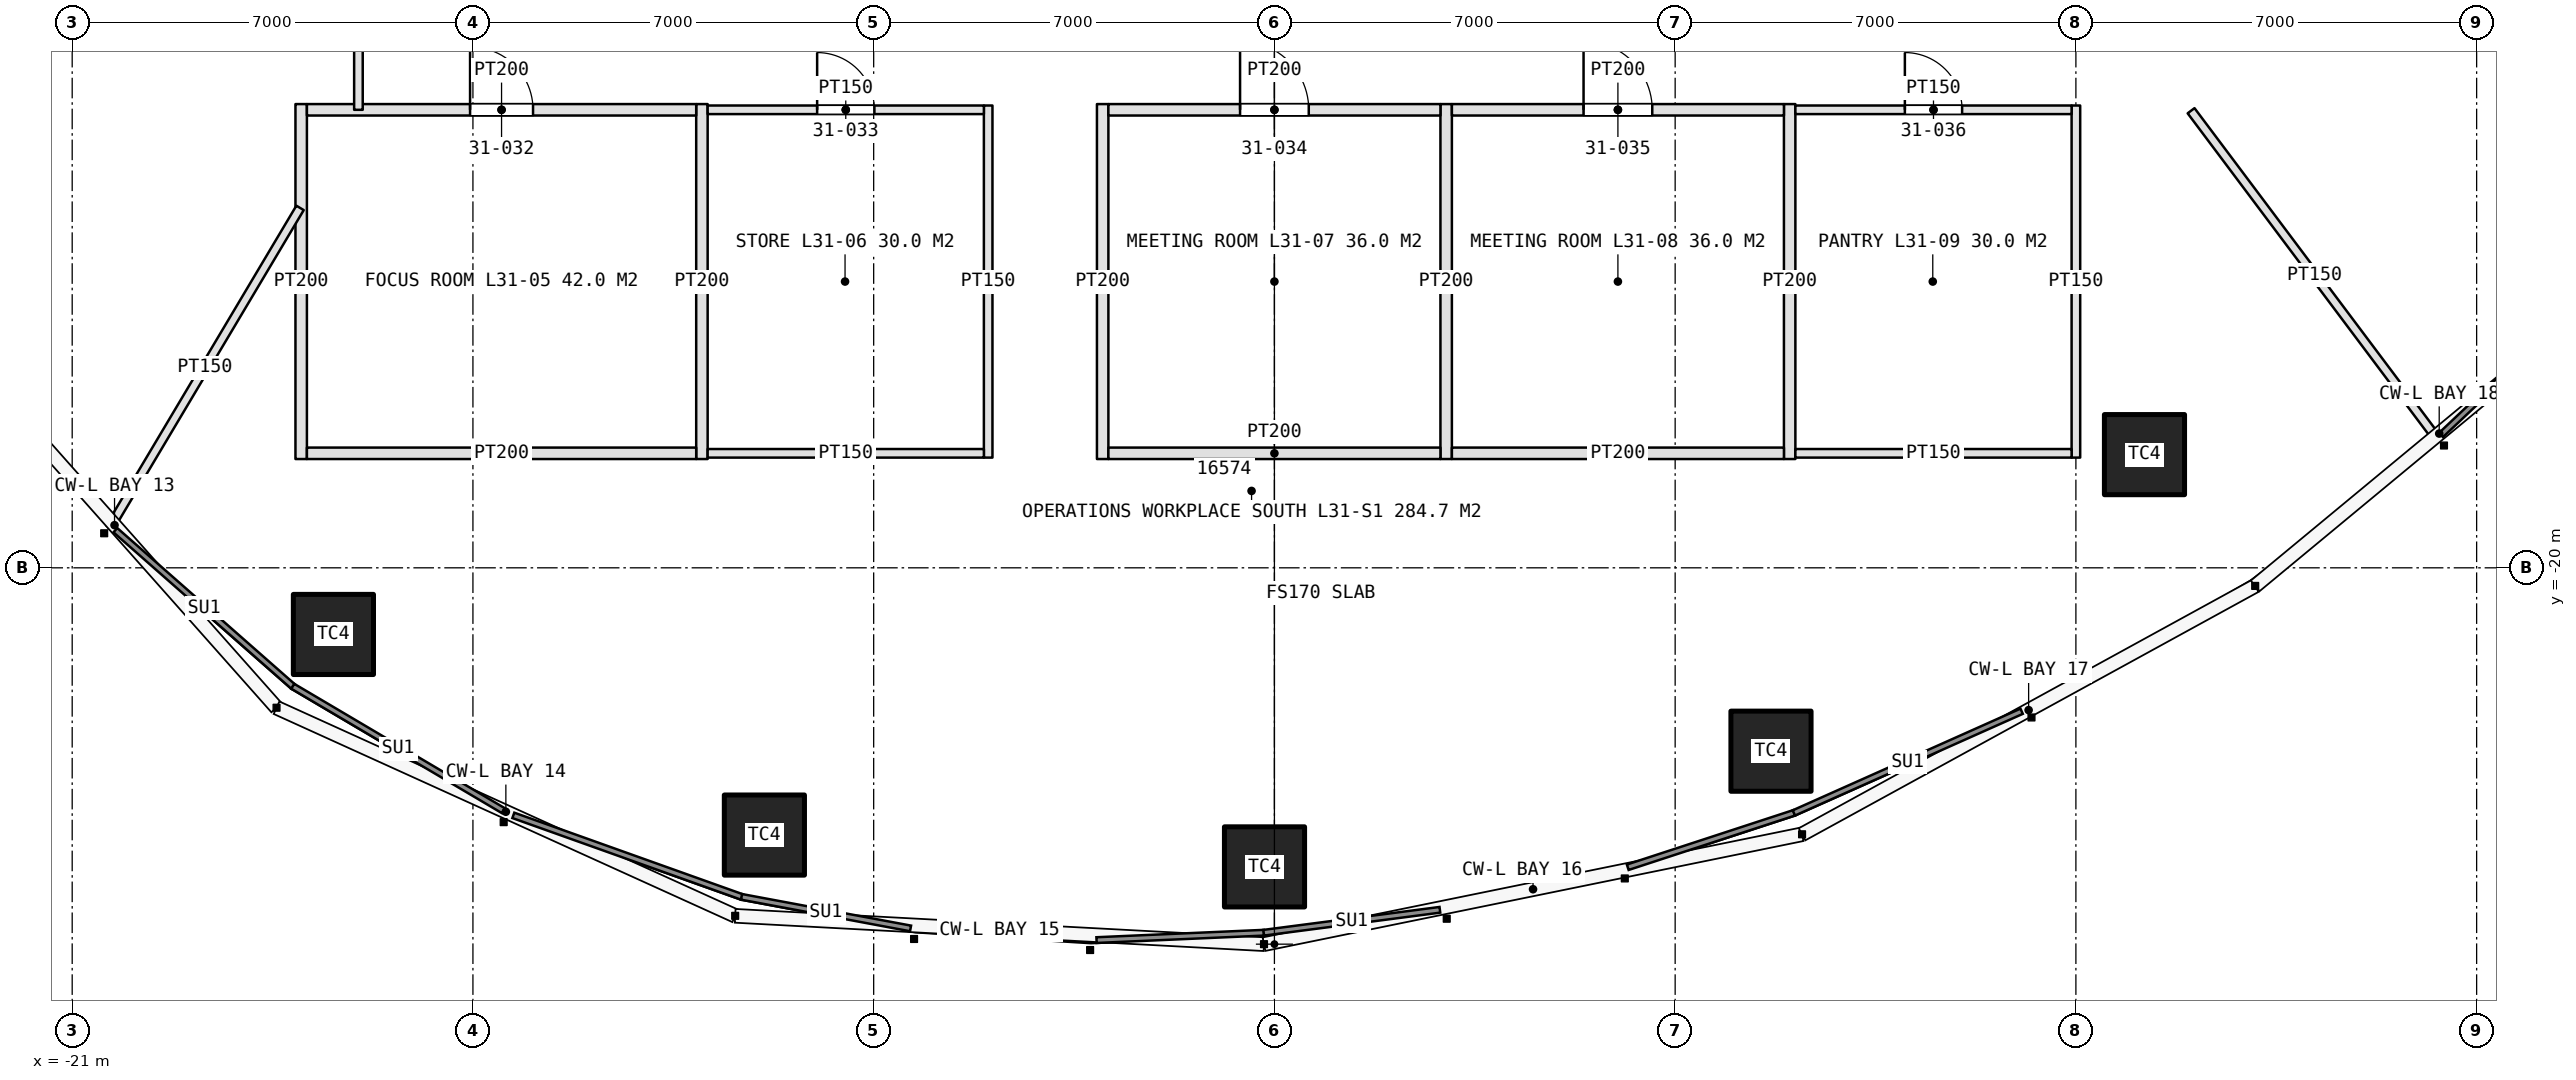
"""IFC4 building model, lengths in metres.
Left out: names, types, materials, properties, quantities, classifications, styles, units other than length and angle.
Written with IfcOpenShell. Run it as: python <this file> out.ifc"""

import sys

from ifc_helpers import new_model, si_unit, direction, frame, frame_2d, origin, origin_2d, place, context, subcontext, project, spatial, rectangle, extrude, element, fill, save


model = new_model("IFC4")
c1 = context("Model", 3, precision=1e-05, world=origin(), true_north=direction((0.0, 1.0)))
c2 = subcontext(c1, "Body", "Model", "MODEL_VIEW")
j1 = project(units=[si_unit("LENGTHUNIT", "METRE"), si_unit("PLANEANGLEUNIT", "RADIAN")], contexts=[c1])
p1 = place(None, origin())
s1 = spatial("IfcSite", under=j1, at=p1, CompositionType="ELEMENT")
p2 = place(p1, origin())
s2 = spatial("IfcBuilding", under=s1, at=p2, CompositionType="ELEMENT")
p3 = place(p2, frame((0.0, 0.0, 147.0)))
s3 = spatial("IfcBuildingStorey", under=s2, at=p3, CompositionType="ELEMENT", Elevation=147.0)
for number, where, z_axis, x_axis in (
    (1, (-16.437, -21.164, 0.0), (0.0, 0.0, 1.0), (1.0, 0.0, 0.0)),
    (2, (-8.909, -24.668, 0.0), (0.0, 0.0, 1.0), (1.0, 0.0, 0.0)),
    (3, (-0.173, -25.224, 0.0), (0.0, 0.0, 1.0), (1.0, 0.0, 0.0)),
    (4, (8.674, -23.203, 0.0), (0.0, 0.0, 1.0), (1.0, 0.0, 0.0)),
    (5, (15.198, -18.023, 0.0), (0.0, 0.0, 1.0), (1.0, 0.0, 0.0)),
):
    element("IfcColumn", number, at=place(p3, frame(where, z_axis=z_axis, x_axis=x_axis)), inside=s3, PredefinedType="COLUMN", context=c2, shape_type="SweptSolid", body=[
        extrude(rectangle(XDim=1.4, YDim=1.4, at=origin_2d()), origin(), (0.0, 0.0, 1.0), 4.2),
    ])
for number, where, z_axis, x_axis in (
    (6, (-17.0, -11.9, 0.0), (0.0, 0.0, 1.0), (0.0, -1.0, 0.0)),
    (7, (-10.0, -11.9, 0.0), (0.0, 0.0, 1.0), (0.0, -1.0, 0.0)),
):
    element("IfcWall", number, at=place(p3, frame(where, z_axis=z_axis, x_axis=x_axis)), inside=s3, PredefinedType="PARTITIONING", context=c2, shape_type="SweptSolid", body=[
        extrude(rectangle(XDim=6.2, YDim=0.2, at=frame_2d((3.1, 0.0))), origin(), (0.0, 0.0, 1.0), 3.0),
    ])
p4 = place(p3, frame((-5.0, -11.925, 0.0), z_axis=(0.0, 0.0, 1.0), x_axis=(0.0, -1.0, 0.0)))
e8 = element("IfcWall", 8, at=p4, inside=s3, PredefinedType="PARTITIONING", context=c2, shape_type="SweptSolid", body=[
    extrude(rectangle(XDim=6.15, YDim=0.15, at=frame_2d((3.075, 0.0))), origin(), (0.0, 0.0, 1.0), 3.0),
])
p5 = place(p3, frame((-16.9, -12.0, 0.0), z_axis=(0.0, 0.0, 1.0), x_axis=(1.0, 0.0, 0.0)))
e9 = element("IfcWall", 9, at=p5, inside=s3, PredefinedType="PARTITIONING", context=c2, shape_type="SweptSolid", body=[
    extrude(rectangle(XDim=6.8, YDim=0.2, at=frame_2d((3.4, 0.0))), origin(), (0.0, 0.0, 1.0), 3.0),
])
p6 = place(p5, frame((2.85, 0.0, 0.0)))
e10 = element("IfcOpeningElement", 10, at=p6, cuts=e9, PredefinedType="OPENING", context=c2, shape_type="SweptSolid", body=[
    extrude(rectangle(XDim=1.1, YDim=2.3, at=frame_2d((0.55, 1.15))), frame((0.0, 0.11, 0.0), z_axis=(0.0, -1.0, 0.0), x_axis=(1.0, 0.0, 0.0)), (0.0, 0.0, 1.0), 0.22),
])
p7 = place(p3, frame((-16.9, -18.0, 0.0), z_axis=(0.0, 0.0, 1.0), x_axis=(1.0, 0.0, 0.0)))
e11 = element("IfcWall", 11, at=p7, inside=s3, PredefinedType="PARTITIONING", context=c2, shape_type="SweptSolid", body=[
    extrude(rectangle(XDim=6.8, YDim=0.2, at=frame_2d((3.4, 0.0))), origin(), (0.0, 0.0, 1.0), 3.0),
])
p8 = place(p3, frame((-9.9, -12.0, 0.0), z_axis=(0.0, 0.0, 1.0), x_axis=(1.0, 0.0, 0.0)))
e12 = element("IfcWall", 12, at=p8, inside=s3, PredefinedType="PARTITIONING", context=c2, shape_type="SweptSolid", body=[
    extrude(rectangle(XDim=4.825, YDim=0.15, at=frame_2d((2.413, 0.0))), origin(), (0.0, 0.0, 1.0), 3.0),
])
p9 = place(p8, frame((1.913, 0.0, 0.0)))
e13 = element("IfcOpeningElement", 13, at=p9, cuts=e12, PredefinedType="OPENING", context=c2, shape_type="SweptSolid", body=[
    extrude(rectangle(XDim=1.0, YDim=2.2, at=frame_2d((0.5, 1.1))), frame((0.0, 0.085, 0.0), z_axis=(0.0, -1.0, 0.0), x_axis=(1.0, 0.0, 0.0)), (0.0, 0.0, 1.0), 0.17),
])
p10 = place(p3, frame((-9.9, -18.0, 0.0), z_axis=(0.0, 0.0, 1.0), x_axis=(1.0, 0.0, 0.0)))
e14 = element("IfcWall", 14, at=p10, inside=s3, PredefinedType="PARTITIONING", context=c2, shape_type="SweptSolid", body=[
    extrude(rectangle(XDim=4.825, YDim=0.15, at=frame_2d((2.413, 0.0))), origin(), (0.0, 0.0, 1.0), 3.0),
])
for number, where, z_axis, x_axis in (
    (15, (-3.0, -11.9, 0.0), (0.0, 0.0, 1.0), (0.0, -1.0, 0.0)),
    (16, (3.0, -11.9, 0.0), (0.0, 0.0, 1.0), (0.0, -1.0, 0.0)),
    (17, (9.0, -11.9, 0.0), (0.0, 0.0, 1.0), (0.0, -1.0, 0.0)),
):
    element("IfcWall", number, at=place(p3, frame(where, z_axis=z_axis, x_axis=x_axis)), inside=s3, PredefinedType="PARTITIONING", context=c2, shape_type="SweptSolid", body=[
        extrude(rectangle(XDim=6.2, YDim=0.2, at=frame_2d((3.1, 0.0))), origin(), (0.0, 0.0, 1.0), 3.0),
    ])
p11 = place(p3, frame((14.0, -11.925, 0.0), z_axis=(0.0, 0.0, 1.0), x_axis=(0.0, -1.0, 0.0)))
e18 = element("IfcWall", 18, at=p11, inside=s3, PredefinedType="PARTITIONING", context=c2, shape_type="SweptSolid", body=[
    extrude(rectangle(XDim=6.15, YDim=0.15, at=frame_2d((3.075, 0.0))), origin(), (0.0, 0.0, 1.0), 3.0),
])
p12 = place(p3, frame((-2.9, -12.0, 0.0), z_axis=(0.0, 0.0, 1.0), x_axis=(1.0, 0.0, 0.0)))
e19 = element("IfcWall", 19, at=p12, inside=s3, PredefinedType="PARTITIONING", context=c2, shape_type="SweptSolid", body=[
    extrude(rectangle(XDim=5.8, YDim=0.2, at=frame_2d((2.9, 0.0))), origin(), (0.0, 0.0, 1.0), 3.0),
])
p13 = place(p12, frame((2.3, 0.0, 0.0)))
e20 = element("IfcOpeningElement", 20, at=p13, cuts=e19, PredefinedType="OPENING", context=c2, shape_type="SweptSolid", body=[
    extrude(rectangle(XDim=1.2, YDim=2.4, at=frame_2d((0.6, 1.2))), frame((0.0, 0.11, 0.0), z_axis=(0.0, -1.0, 0.0), x_axis=(1.0, 0.0, 0.0)), (0.0, 0.0, 1.0), 0.22),
])
p14 = place(p3, frame((-2.9, -18.0, 0.0), z_axis=(0.0, 0.0, 1.0), x_axis=(1.0, 0.0, 0.0)))
e21 = element("IfcWall", 21, at=p14, inside=s3, PredefinedType="PARTITIONING", context=c2, shape_type="SweptSolid", body=[
    extrude(rectangle(XDim=5.8, YDim=0.2, at=frame_2d((2.9, 0.0))), origin(), (0.0, 0.0, 1.0), 3.0),
])
p15 = place(p3, frame((3.1, -12.0, 0.0), z_axis=(0.0, 0.0, 1.0), x_axis=(1.0, 0.0, 0.0)))
e22 = element("IfcWall", 22, at=p15, inside=s3, PredefinedType="PARTITIONING", context=c2, shape_type="SweptSolid", body=[
    extrude(rectangle(XDim=5.8, YDim=0.2, at=frame_2d((2.9, 0.0))), origin(), (0.0, 0.0, 1.0), 3.0),
])
p16 = place(p15, frame((2.3, 0.0, 0.0)))
e23 = element("IfcOpeningElement", 23, at=p16, cuts=e22, PredefinedType="OPENING", context=c2, shape_type="SweptSolid", body=[
    extrude(rectangle(XDim=1.2, YDim=2.4, at=frame_2d((0.6, 1.2))), frame((0.0, 0.11, 0.0), z_axis=(0.0, -1.0, 0.0), x_axis=(1.0, 0.0, 0.0)), (0.0, 0.0, 1.0), 0.22),
])
p17 = place(p3, frame((3.1, -18.0, 0.0), z_axis=(0.0, 0.0, 1.0), x_axis=(1.0, 0.0, 0.0)))
e24 = element("IfcWall", 24, at=p17, inside=s3, PredefinedType="PARTITIONING", context=c2, shape_type="SweptSolid", body=[
    extrude(rectangle(XDim=5.8, YDim=0.2, at=frame_2d((2.9, 0.0))), origin(), (0.0, 0.0, 1.0), 3.0),
])
p18 = place(p3, frame((9.1, -12.0, 0.0), z_axis=(0.0, 0.0, 1.0), x_axis=(1.0, 0.0, 0.0)))
e25 = element("IfcWall", 25, at=p18, inside=s3, PredefinedType="PARTITIONING", context=c2, shape_type="SweptSolid", body=[
    extrude(rectangle(XDim=4.825, YDim=0.15, at=frame_2d((2.413, 0.0))), origin(), (0.0, 0.0, 1.0), 3.0),
])
p19 = place(p18, frame((1.913, 0.0, 0.0)))
e26 = element("IfcOpeningElement", 26, at=p19, cuts=e25, PredefinedType="OPENING", context=c2, shape_type="SweptSolid", body=[
    extrude(rectangle(XDim=1.0, YDim=2.2, at=frame_2d((0.5, 1.1))), frame((0.0, 0.085, 0.0), z_axis=(0.0, -1.0, 0.0), x_axis=(1.0, 0.0, 0.0)), (0.0, 0.0, 1.0), 0.17),
])
p20 = place(p3, frame((9.1, -18.0, 0.0), z_axis=(0.0, 0.0, 1.0), x_axis=(1.0, 0.0, 0.0)))
e27 = element("IfcWall", 27, at=p20, inside=s3, PredefinedType="PARTITIONING", context=c2, shape_type="SweptSolid", body=[
    extrude(rectangle(XDim=4.825, YDim=0.15, at=frame_2d((2.413, 0.0))), origin(), (0.0, 0.0, 1.0), 3.0),
])
p21 = place(p3, frame((-17.02, -13.713, 0.0), z_axis=(0.0, 0.0, 1.0), x_axis=(-0.511508304982, -0.859278333216, 0.0)))
e28 = element("IfcWall", 28, at=p21, inside=s3, PredefinedType="PARTITIONING", context=c2, shape_type="SweptSolid", body=[
    extrude(rectangle(XDim=6.497, YDim=0.15, at=frame_2d((3.248, 0.0))), origin(), (0.0, 0.0, 1.0), 3.0),
])
p22 = place(p3, frame((16.012, -12.016, 0.0), z_axis=(0.0, 0.0, 1.0), x_axis=(0.600059749679, -0.799955184254, 0.0)))
e29 = element("IfcWall", 29, at=p22, inside=s3, PredefinedType="PARTITIONING", context=c2, shape_type="SweptSolid", body=[
    extrude(rectangle(XDim=7.191, YDim=0.15, at=frame_2d((3.596, 0.0))), origin(), (0.0, 0.0, 1.0), 3.0),
])
p23 = place(p3, frame((-16.0, -9.0, 0.0), z_axis=(0.0, 0.0, 1.0), x_axis=(0.0, -1.0, 0.0)))
e30 = element("IfcWall", 30, at=p23, inside=s3, PredefinedType="PARTITIONING", context=c2, shape_type="SweptSolid", body=[
    extrude(rectangle(XDim=3.0, YDim=0.15, at=frame_2d((1.5, 0.0))), origin(), (0.0, 0.0, 1.0), 3.0),
])
p24 = place(p6, origin())
e31 = element("IfcDoor", 31, at=p24, inside=s3, OperationType="SINGLE_SWING_LEFT", PredefinedType="DOOR", context=c2, shape_type="SweptSolid", body=[
    extrude(rectangle(XDim=1.1, YDim=2.3, at=frame_2d((0.55, 1.15))), frame((0.0, 0.025, 0.0), z_axis=(0.0, -1.0, 0.0), x_axis=(1.0, 0.0, 0.0)), (0.0, 0.0, 1.0), 0.05),
])
fill(e10, e31)
p25 = place(p9, origin())
e32 = element("IfcDoor", 32, at=p25, inside=s3, OperationType="SINGLE_SWING_LEFT", PredefinedType="DOOR", context=c2, shape_type="SweptSolid", body=[
    extrude(rectangle(XDim=1.0, YDim=2.2, at=frame_2d((0.5, 1.1))), frame((0.0, 0.025, 0.0), z_axis=(0.0, -1.0, 0.0), x_axis=(1.0, 0.0, 0.0)), (0.0, 0.0, 1.0), 0.05),
])
fill(e13, e32)
p26 = place(p13, origin())
e33 = element("IfcDoor", 33, at=p26, inside=s3, OperationType="SINGLE_SWING_LEFT", PredefinedType="DOOR", context=c2, shape_type="SweptSolid", body=[
    extrude(rectangle(XDim=1.2, YDim=2.4, at=frame_2d((0.6, 1.2))), frame((0.0, 0.025, 0.0), z_axis=(0.0, -1.0, 0.0), x_axis=(1.0, 0.0, 0.0)), (0.0, 0.0, 1.0), 0.05),
])
fill(e20, e33)
p27 = place(p16, origin())
e34 = element("IfcDoor", 34, at=p27, inside=s3, OperationType="SINGLE_SWING_LEFT", PredefinedType="DOOR", context=c2, shape_type="SweptSolid", body=[
    extrude(rectangle(XDim=1.2, YDim=2.4, at=frame_2d((0.6, 1.2))), frame((0.0, 0.025, 0.0), z_axis=(0.0, -1.0, 0.0), x_axis=(1.0, 0.0, 0.0)), (0.0, 0.0, 1.0), 0.05),
])
fill(e23, e34)
p28 = place(p19, origin())
e35 = element("IfcDoor", 35, at=p28, inside=s3, OperationType="SINGLE_SWING_LEFT", PredefinedType="DOOR", context=c2, shape_type="SweptSolid", body=[
    extrude(rectangle(XDim=1.0, YDim=2.2, at=frame_2d((0.5, 1.1))), frame((0.0, 0.025, 0.0), z_axis=(0.0, -1.0, 0.0), x_axis=(1.0, 0.0, 0.0)), (0.0, 0.0, 1.0), 0.05),
])
fill(e26, e35)
save(model, sys.argv[1])
